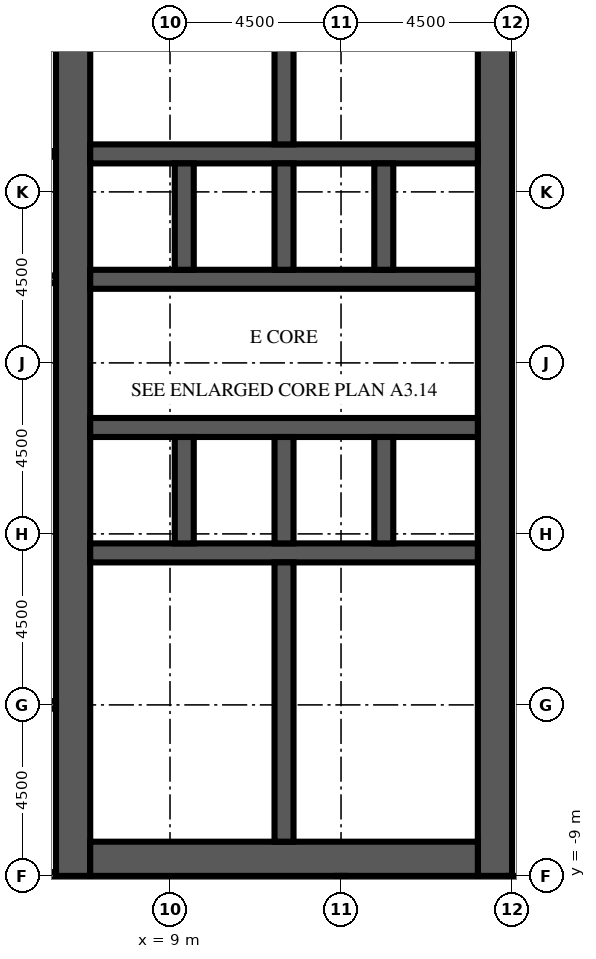
"""IFC4 building model, lengths in metres.
Left out: names, types, materials, properties, quantities, classifications, styles, units other than length and angle.
Written with IfcOpenShell. Run it as: python <this file> out.ifc"""

import sys

from ifc_helpers import new_model, si_unit, direction, frame, frame_2d, origin, place, context, subcontext, project, spatial, rectangle, extrude, element, fill, save


model = new_model("IFC4")
c1 = context("Model", 3, precision=1e-05, world=origin(), true_north=direction((0.0, 1.0)))
c2 = subcontext(c1, "Body", "Model", "MODEL_VIEW")
j1 = project(units=[si_unit("LENGTHUNIT", "METRE"), si_unit("PLANEANGLEUNIT", "RADIAN")], contexts=[c1])
p1 = place(None, origin())
s1 = spatial("IfcSite", under=j1, at=p1, CompositionType="ELEMENT")
p2 = place(p1, origin())
s2 = spatial("IfcBuilding", under=s1, at=p2, CompositionType="ELEMENT")
p3 = place(p2, frame((0.0, 0.0, 82.0)))
s3 = spatial("IfcBuildingStorey", under=s2, at=p3, CompositionType="ELEMENT", Elevation=82.0)
p4 = place(p3, frame((6.45, -9.0, 0.0), z_axis=(0.0, 0.0, 1.0), x_axis=(0.0, 1.0, 0.0)))
e1 = element("IfcWall", 1, at=p4, inside=s3, PredefinedType="SHEAR", context=c2, shape_type="SweptSolid", body=[
    extrude(rectangle(XDim=27.5, YDim=0.9, at=frame_2d((13.75, 0.0))), origin(), (0.0, 0.0, 1.0), 4.1),
])
p5 = place(p4, frame((12.55, 0.0, 0.0)))
e2 = element("IfcOpeningElement", 2, at=p5, cuts=e1, PredefinedType="OPENING", context=c2, shape_type="SweptSolid", body=[
    extrude(rectangle(XDim=2.4, YDim=2.4, at=frame_2d((1.2, 1.2))), frame((0.0, 0.46, 0.0), z_axis=(0.0, -1.0, 0.0), x_axis=(1.0, 0.0, 0.0)), (0.0, 0.0, 1.0), 0.92),
])
p6 = place(p4, frame((5.445, 0.0, 0.0)))
e3 = element("IfcOpeningElement", 3, at=p6, cuts=e1, PredefinedType="OPENING", context=c2, shape_type="SweptSolid", body=[
    extrude(rectangle(XDim=1.2, YDim=2.1, at=frame_2d((0.6, 1.05))), frame((0.0, 0.46, 0.0), z_axis=(0.0, -1.0, 0.0), x_axis=(1.0, 0.0, 0.0)), (0.0, 0.0, 1.0), 0.92),
])
p7 = place(p4, frame((19.485, 0.0, 0.0)))
e4 = element("IfcOpeningElement", 4, at=p7, cuts=e1, PredefinedType="OPENING", context=c2, shape_type="SweptSolid", body=[
    extrude(rectangle(XDim=1.0, YDim=2.1, at=frame_2d((0.5, 1.05))), frame((0.0, 0.46, 0.0), z_axis=(0.0, -1.0, 0.0), x_axis=(1.0, 0.0, 0.0)), (0.0, 0.0, 1.0), 0.92),
])
p8 = place(p4, frame((21.139, 0.0, 0.0)))
e5 = element("IfcOpeningElement", 5, at=p8, cuts=e1, PredefinedType="OPENING", context=c2, shape_type="SweptSolid", body=[
    extrude(rectangle(XDim=1.0, YDim=2.1, at=frame_2d((0.5, 1.05))), frame((0.0, 0.46, 0.0), z_axis=(0.0, -1.0, 0.0), x_axis=(1.0, 0.0, 0.0)), (0.0, 0.0, 1.0), 0.92),
])
p9 = place(p4, frame((23.16, 0.0, 0.0)))
e6 = element("IfcOpeningElement", 6, at=p9, cuts=e1, PredefinedType="OPENING", context=c2, shape_type="SweptSolid", body=[
    extrude(rectangle(XDim=1.0, YDim=2.1, at=frame_2d((0.5, 1.05))), frame((0.0, 0.46, 0.0), z_axis=(0.0, -1.0, 0.0), x_axis=(1.0, 0.0, 0.0)), (0.0, 0.0, 1.0), 0.92),
])
p10 = place(p4, frame((25.181, 0.0, 0.0)))
e7 = element("IfcOpeningElement", 7, at=p10, cuts=e1, PredefinedType="OPENING", context=c2, shape_type="SweptSolid", body=[
    extrude(rectangle(XDim=1.0, YDim=2.1, at=frame_2d((0.5, 1.05))), frame((0.0, 0.46, 0.0), z_axis=(0.0, -1.0, 0.0), x_axis=(1.0, 0.0, 0.0)), (0.0, 0.0, 1.0), 0.92),
])
p11 = place(p3, frame((17.55, -9.0, 0.0), z_axis=(0.0, 0.0, 1.0), x_axis=(0.0, 1.0, 0.0)))
e8 = element("IfcWall", 8, at=p11, inside=s3, PredefinedType="SHEAR", context=c2, shape_type="SweptSolid", body=[
    extrude(rectangle(XDim=27.5, YDim=0.9, at=frame_2d((13.75, 0.0))), origin(), (0.0, 0.0, 1.0), 4.1),
])
p12 = place(p11, frame((12.55, 0.0, 0.0)))
e9 = element("IfcOpeningElement", 9, at=p12, cuts=e8, PredefinedType="OPENING", context=c2, shape_type="SweptSolid", body=[
    extrude(rectangle(XDim=2.4, YDim=2.4, at=frame_2d((1.2, 1.2))), frame((0.0, 0.46, 0.0), z_axis=(0.0, -1.0, 0.0), x_axis=(1.0, 0.0, 0.0)), (0.0, 0.0, 1.0), 0.92),
])
p13 = place(p11, frame((6.825, 0.0, 0.0)))
e10 = element("IfcOpeningElement", 10, at=p13, cuts=e8, PredefinedType="OPENING", context=c2, shape_type="SweptSolid", body=[
    extrude(rectangle(XDim=1.2, YDim=2.1, at=frame_2d((0.6, 1.05))), frame((0.0, 0.46, 0.0), z_axis=(0.0, -1.0, 0.0), x_axis=(1.0, 0.0, 0.0)), (0.0, 0.0, 1.0), 0.92),
])
p14 = place(p11, frame((19.475, 0.0, 0.0)))
e11 = element("IfcOpeningElement", 11, at=p14, cuts=e8, PredefinedType="OPENING", context=c2, shape_type="SweptSolid", body=[
    extrude(rectangle(XDim=1.2, YDim=2.1, at=frame_2d((0.6, 1.05))), frame((0.0, 0.46, 0.0), z_axis=(0.0, -1.0, 0.0), x_axis=(1.0, 0.0, 0.0)), (0.0, 0.0, 1.0), 0.92),
])
p15 = place(p3, frame((6.9, -8.55, 0.0), z_axis=(0.0, 0.0, 1.0), x_axis=(1.0, 0.0, 0.0)))
e12 = element("IfcWall", 12, at=p15, inside=s3, PredefinedType="SHEAR", context=c2, shape_type="SweptSolid", body=[
    extrude(rectangle(XDim=10.2, YDim=0.9, at=frame_2d((5.1, 0.0))), origin(), (0.0, 0.0, 1.0), 4.1),
])
p16 = place(p3, frame((6.9, -0.5, 0.0), z_axis=(0.0, 0.0, 1.0), x_axis=(1.0, 0.0, 0.0)))
e13 = element("IfcWall", 13, at=p16, inside=s3, PredefinedType="SHEAR", context=c2, shape_type="SweptSolid", body=[
    extrude(rectangle(XDim=10.2, YDim=0.5, at=frame_2d((5.1, 0.0))), origin(), (0.0, 0.0, 1.0), 4.1),
])
p17 = place(p3, frame((6.9, 2.8, 0.0), z_axis=(0.0, 0.0, 1.0), x_axis=(1.0, 0.0, 0.0)))
e14 = element("IfcWall", 14, at=p17, inside=s3, PredefinedType="SHEAR", context=c2, shape_type="SweptSolid", body=[
    extrude(rectangle(XDim=10.2, YDim=0.5, at=frame_2d((5.1, 0.0))), origin(), (0.0, 0.0, 1.0), 4.1),
])
p18 = place(p17, frame((0.562, 0.0, 0.0)))
e15 = element("IfcOpeningElement", 15, at=p18, cuts=e14, PredefinedType="OPENING", context=c2, shape_type="SweptSolid", body=[
    extrude(rectangle(XDim=1.1, YDim=2.1, at=frame_2d((0.55, 1.05))), frame((0.0, 0.26, 0.0), z_axis=(0.0, -1.0, 0.0), x_axis=(1.0, 0.0, 0.0)), (0.0, 0.0, 1.0), 0.52),
])
p19 = place(p17, frame((3.238, 0.0, 0.0)))
e16 = element("IfcOpeningElement", 16, at=p19, cuts=e14, PredefinedType="OPENING", context=c2, shape_type="SweptSolid", body=[
    extrude(rectangle(XDim=1.1, YDim=2.1, at=frame_2d((0.55, 1.05))), frame((0.0, 0.26, 0.0), z_axis=(0.0, -1.0, 0.0), x_axis=(1.0, 0.0, 0.0)), (0.0, 0.0, 1.0), 0.52),
])
p20 = place(p17, frame((8.538, 0.0, 0.0)))
e17 = element("IfcOpeningElement", 17, at=p20, cuts=e14, PredefinedType="OPENING", context=c2, shape_type="SweptSolid", body=[
    extrude(rectangle(XDim=1.1, YDim=2.1, at=frame_2d((0.55, 1.05))), frame((0.0, 0.26, 0.0), z_axis=(0.0, -1.0, 0.0), x_axis=(1.0, 0.0, 0.0)), (0.0, 0.0, 1.0), 0.52),
])
p21 = place(p3, frame((6.9, 6.7, 0.0), z_axis=(0.0, 0.0, 1.0), x_axis=(1.0, 0.0, 0.0)))
e18 = element("IfcWall", 18, at=p21, inside=s3, PredefinedType="SHEAR", context=c2, shape_type="SweptSolid", body=[
    extrude(rectangle(XDim=10.2, YDim=0.5, at=frame_2d((5.1, 0.0))), origin(), (0.0, 0.0, 1.0), 4.1),
])
p22 = place(p21, frame((0.562, 0.0, 0.0)))
e19 = element("IfcOpeningElement", 19, at=p22, cuts=e18, PredefinedType="OPENING", context=c2, shape_type="SweptSolid", body=[
    extrude(rectangle(XDim=1.1, YDim=2.1, at=frame_2d((0.55, 1.05))), frame((0.0, 0.26, 0.0), z_axis=(0.0, -1.0, 0.0), x_axis=(1.0, 0.0, 0.0)), (0.0, 0.0, 1.0), 0.52),
])
p23 = place(p21, frame((3.288, 0.0, 0.0)))
e20 = element("IfcOpeningElement", 20, at=p23, cuts=e18, PredefinedType="OPENING", context=c2, shape_type="SweptSolid", body=[
    extrude(rectangle(XDim=1.0, YDim=2.1, at=frame_2d((0.5, 1.05))), frame((0.0, 0.26, 0.0), z_axis=(0.0, -1.0, 0.0), x_axis=(1.0, 0.0, 0.0)), (0.0, 0.0, 1.0), 0.52),
])
p24 = place(p21, frame((5.913, 0.0, 0.0)))
e21 = element("IfcOpeningElement", 21, at=p24, cuts=e18, PredefinedType="OPENING", context=c2, shape_type="SweptSolid", body=[
    extrude(rectangle(XDim=1.0, YDim=2.1, at=frame_2d((0.5, 1.05))), frame((0.0, 0.26, 0.0), z_axis=(0.0, -1.0, 0.0), x_axis=(1.0, 0.0, 0.0)), (0.0, 0.0, 1.0), 0.52),
])
p25 = place(p21, frame((8.587, 0.0, 0.0)))
e22 = element("IfcOpeningElement", 22, at=p25, cuts=e18, PredefinedType="OPENING", context=c2, shape_type="SweptSolid", body=[
    extrude(rectangle(XDim=1.0, YDim=2.1, at=frame_2d((0.5, 1.05))), frame((0.0, 0.26, 0.0), z_axis=(0.0, -1.0, 0.0), x_axis=(1.0, 0.0, 0.0)), (0.0, 0.0, 1.0), 0.52),
])
p26 = place(p3, frame((6.9, 10.0, 0.0), z_axis=(0.0, 0.0, 1.0), x_axis=(1.0, 0.0, 0.0)))
e23 = element("IfcWall", 23, at=p26, inside=s3, PredefinedType="SHEAR", context=c2, shape_type="SweptSolid", body=[
    extrude(rectangle(XDim=10.2, YDim=0.5, at=frame_2d((5.1, 0.0))), origin(), (0.0, 0.0, 1.0), 4.1),
])
for number, where, z_axis, x_axis in (
    (24, (9.375, -0.25, 0.0), (0.0, 0.0, 1.0), (0.0, 1.0, 0.0)),
    (25, (9.375, 6.95, 0.0), (0.0, 0.0, 1.0), (0.0, 1.0, 0.0)),
    (26, (12.0, -0.25, 0.0), (0.0, 0.0, 1.0), (0.0, 1.0, 0.0)),
    (27, (12.0, 6.95, 0.0), (0.0, 0.0, 1.0), (0.0, 1.0, 0.0)),
    (28, (14.625, -0.25, 0.0), (0.0, 0.0, 1.0), (0.0, 1.0, 0.0)),
    (29, (14.625, 6.95, 0.0), (0.0, 0.0, 1.0), (0.0, 1.0, 0.0)),
):
    element("IfcWall", number, at=place(p3, frame(where, z_axis=z_axis, x_axis=x_axis)), inside=s3, PredefinedType="SHEAR", context=c2, shape_type="SweptSolid", body=[
        extrude(rectangle(XDim=2.8, YDim=0.5, at=frame_2d((1.4, 0.0))), origin(), (0.0, 0.0, 1.0), 4.1),
    ])
for number, where, z_axis, x_axis in (
    (30, (12.0, -8.1, 0.0), (0.0, 0.0, 1.0), (0.0, 1.0, 0.0)),
    (31, (12.0, 10.25, 0.0), (0.0, 0.0, 1.0), (0.0, 1.0, 0.0)),
):
    element("IfcWall", number, at=place(p3, frame(where, z_axis=z_axis, x_axis=x_axis)), inside=s3, PredefinedType="SHEAR", context=c2, shape_type="SweptSolid", body=[
        extrude(rectangle(XDim=7.35, YDim=0.5, at=frame_2d((3.675, 0.0))), origin(), (0.0, 0.0, 1.0), 4.1),
    ])
p27 = place(p3, frame((6.9, -5.16, 0.0), z_axis=(0.0, 0.0, 1.0), x_axis=(1.0, 0.0, 0.0)))
e32 = element("IfcWall", 32, at=p27, inside=s3, PredefinedType="PARTITIONING", context=c2, shape_type="SweptSolid", body=[
    extrude(rectangle(XDim=1.5, YDim=0.1, at=frame_2d((0.75, 0.0))), origin(), (0.0, 0.0, 1.0), 3.65),
])
p28 = place(p27, frame((0.25, 0.0, 0.0)))
e33 = element("IfcOpeningElement", 33, at=p28, cuts=e32, PredefinedType="OPENING", context=c2, shape_type="SweptSolid", body=[
    extrude(rectangle(XDim=1.0, YDim=2.1, at=frame_2d((0.5, 1.05))), frame((0.0, 0.06, 0.0), z_axis=(0.0, -1.0, 0.0), x_axis=(1.0, 0.0, 0.0)), (0.0, 0.0, 1.0), 0.12),
])
p29 = place(p3, frame((8.4, -5.16, 0.0), z_axis=(0.0, 0.0, 1.0), x_axis=(0.0, 1.0, 0.0)))
e34 = element("IfcWall", 34, at=p29, inside=s3, PredefinedType="PARTITIONING", context=c2, shape_type="SweptSolid", body=[
    extrude(rectangle(XDim=2.205, YDim=0.1, at=frame_2d((1.103, 0.0))), origin(), (0.0, 0.0, 1.0), 3.65),
])
p30 = place(p29, frame((0.603, 0.0, 0.0)))
e35 = element("IfcOpeningElement", 35, at=p30, cuts=e34, PredefinedType="OPENING", context=c2, shape_type="SweptSolid", body=[
    extrude(rectangle(XDim=1.0, YDim=2.1, at=frame_2d((0.5, 1.05))), frame((0.0, 0.06, 0.0), z_axis=(0.0, -1.0, 0.0), x_axis=(1.0, 0.0, 0.0)), (0.0, 0.0, 1.0), 0.12),
])
p31 = place(p3, frame((8.4, -2.955, 0.0), z_axis=(0.0, 0.0, 1.0), x_axis=(0.0, 1.0, 0.0)))
e36 = element("IfcWall", 36, at=p31, inside=s3, PredefinedType="PARTITIONING", context=c2, shape_type="SweptSolid", body=[
    extrude(rectangle(XDim=2.205, YDim=0.1, at=frame_2d((1.103, 0.0))), origin(), (0.0, 0.0, 1.0), 3.65),
])
p32 = place(p31, frame((0.603, 0.0, 0.0)))
e37 = element("IfcOpeningElement", 37, at=p32, cuts=e36, PredefinedType="OPENING", context=c2, shape_type="SweptSolid", body=[
    extrude(rectangle(XDim=1.0, YDim=2.1, at=frame_2d((0.5, 1.05))), frame((0.0, 0.06, 0.0), z_axis=(0.0, -1.0, 0.0), x_axis=(1.0, 0.0, 0.0)), (0.0, 0.0, 1.0), 0.12),
])
for number, where, z_axis, x_axis in (
    (38, (8.4, -5.16, 0.0), (0.0, 0.0, 1.0), (1.0, 0.0, 0.0)),
    (39, (8.4, -2.955, 0.0), (0.0, 0.0, 1.0), (1.0, 0.0, 0.0)),
):
    element("IfcWall", number, at=place(p3, frame(where, z_axis=z_axis, x_axis=x_axis)), inside=s3, PredefinedType="PARTITIONING", context=c2, shape_type="SweptSolid", body=[
        extrude(rectangle(XDim=3.35, YDim=0.1, at=frame_2d((1.675, 0.0))), origin(), (0.0, 0.0, 1.0), 3.65),
    ])
p33 = place(p3, frame((6.9, 11.72, 0.0), z_axis=(0.0, 0.0, 1.0), x_axis=(1.0, 0.0, 0.0)))
e40 = element("IfcWall", 40, at=p33, inside=s3, PredefinedType="PARTITIONING", context=c2, shape_type="SweptSolid", body=[
    extrude(rectangle(XDim=4.85, YDim=0.1, at=frame_2d((2.425, 0.0))), origin(), (0.0, 0.0, 1.0), 3.65),
])
p34 = place(p3, frame((13.5, -21.9, 0.0), z_axis=(0.0, 0.0, 1.0), x_axis=(0.0, 1.0, 0.0)))
e41 = element("IfcWall", 41, at=p34, inside=s3, PredefinedType="PARTITIONING", context=c2, shape_type="SweptSolid", body=[
    extrude(rectangle(XDim=12.9, YDim=0.2, at=frame_2d((6.45, 0.0))), origin(), (0.0, 0.0, 1.0), 3.65),
])
p35 = place(p3, frame((18.0, -17.3, 0.0), z_axis=(0.0, 0.0, 1.0), x_axis=(0.0, 1.0, 0.0)))
e42 = element("IfcWall", 42, at=p35, inside=s3, PredefinedType="PARTITIONING", context=c2, shape_type="SweptSolid", body=[
    extrude(rectangle(XDim=8.3, YDim=0.2, at=frame_2d((4.15, 0.0))), origin(), (0.0, 0.0, 1.0), 3.65),
])
p36 = place(p35, frame((4.4, 0.0, 0.0)))
e43 = element("IfcOpeningElement", 43, at=p36, cuts=e42, PredefinedType="OPENING", context=c2, shape_type="SweptSolid", body=[
    extrude(rectangle(XDim=1.0, YDim=2.1, at=frame_2d((0.5, 1.05))), frame((0.0, 0.11, 0.0), z_axis=(0.0, -1.0, 0.0), x_axis=(1.0, 0.0, 0.0)), (0.0, 0.0, 1.0), 0.22),
])
p37 = place(p3, frame((1.5, -9.0, 0.0), z_axis=(0.0, 0.0, 1.0), x_axis=(1.0, 0.0, 0.0)))
e44 = element("IfcWall", 44, at=p37, inside=s3, PredefinedType="PARTITIONING", context=c2, shape_type="SweptSolid", body=[
    extrude(rectangle(XDim=4.5, YDim=0.2, at=frame_2d((2.25, 0.0))), origin(), (0.0, 0.0, 1.0), 3.65),
])
p38 = place(p3, frame((6.0, -4.5, 0.0), z_axis=(0.0, 0.0, 1.0), x_axis=(-1.0, 0.0, 0.0)))
e45 = element("IfcWall", 45, at=p38, inside=s3, PredefinedType="PARTITIONING", context=c2, shape_type="SweptSolid", body=[
    extrude(rectangle(XDim=4.5, YDim=0.2, at=frame_2d((2.25, 0.0))), origin(), (0.0, 0.0, 1.0), 3.65),
])
p39 = place(p38, frame((1.15, 0.0, 0.0)))
e46 = element("IfcOpeningElement", 46, at=p39, cuts=e45, PredefinedType="OPENING", context=c2, shape_type="SweptSolid", body=[
    extrude(rectangle(XDim=1.0, YDim=2.1, at=frame_2d((0.5, 1.05))), frame((0.0, 0.11, 0.0), z_axis=(0.0, -1.0, 0.0), x_axis=(1.0, 0.0, 0.0)), (0.0, 0.0, 1.0), 0.22),
])
p40 = place(p3, frame((1.5, 6.7, 0.0), z_axis=(0.0, 0.0, 1.0), x_axis=(1.0, 0.0, 0.0)))
e47 = element("IfcWall", 47, at=p40, inside=s3, PredefinedType="PARTITIONING", context=c2, shape_type="SweptSolid", body=[
    extrude(rectangle(XDim=4.5, YDim=0.2, at=frame_2d((2.25, 0.0))), origin(), (0.0, 0.0, 1.0), 3.65),
])
p41 = place(p40, frame((1.85, 0.0, 0.0)))
e48 = element("IfcOpeningElement", 48, at=p41, cuts=e47, PredefinedType="OPENING", context=c2, shape_type="SweptSolid", body=[
    extrude(rectangle(XDim=1.0, YDim=2.1, at=frame_2d((0.5, 1.05))), frame((0.0, 0.11, 0.0), z_axis=(0.0, -1.0, 0.0), x_axis=(1.0, 0.0, 0.0)), (0.0, 0.0, 1.0), 0.22),
])
p42 = place(p3, frame((1.5, 10.0, 0.0), z_axis=(0.0, 0.0, 1.0), x_axis=(1.0, 0.0, 0.0)))
e49 = element("IfcWall", 49, at=p42, inside=s3, PredefinedType="PARTITIONING", context=c2, shape_type="SweptSolid", body=[
    extrude(rectangle(XDim=4.5, YDim=0.15, at=frame_2d((2.25, 0.0))), origin(), (0.0, 0.0, 1.0), 3.65),
])
p43 = place(p42, frame((1.35, 0.0, 0.0)))
e50 = element("IfcOpeningElement", 50, at=p43, cuts=e49, PredefinedType="OPENING", context=c2, shape_type="SweptSolid", body=[
    extrude(rectangle(XDim=1.0, YDim=2.1, at=frame_2d((0.5, 1.05))), frame((0.0, 0.085, 0.0), z_axis=(0.0, -1.0, 0.0), x_axis=(1.0, 0.0, 0.0)), (0.0, 0.0, 1.0), 0.17),
])
p44 = place(p18, origin())
e51 = element("IfcDoor", 51, at=p44, inside=s3, OperationType="DOUBLE_DOOR_SLIDING", PredefinedType="DOOR", context=c2, shape_type="SweptSolid", body=[
    extrude(rectangle(XDim=1.1, YDim=2.1, at=frame_2d((0.55, 1.05))), frame((0.0, 0.025, 0.0), z_axis=(0.0, -1.0, 0.0), x_axis=(1.0, 0.0, 0.0)), (0.0, 0.0, 1.0), 0.05),
])
fill(e15, e51)
p45 = place(p19, origin())
e52 = element("IfcDoor", 52, at=p45, inside=s3, OperationType="DOUBLE_DOOR_SLIDING", PredefinedType="DOOR", context=c2, shape_type="SweptSolid", body=[
    extrude(rectangle(XDim=1.1, YDim=2.1, at=frame_2d((0.55, 1.05))), frame((0.0, 0.025, 0.0), z_axis=(0.0, -1.0, 0.0), x_axis=(1.0, 0.0, 0.0)), (0.0, 0.0, 1.0), 0.05),
])
fill(e16, e52)
p46 = place(p20, origin())
e53 = element("IfcDoor", 53, at=p46, inside=s3, OperationType="DOUBLE_DOOR_SLIDING", PredefinedType="DOOR", context=c2, shape_type="SweptSolid", body=[
    extrude(rectangle(XDim=1.1, YDim=2.1, at=frame_2d((0.55, 1.05))), frame((0.0, 0.025, 0.0), z_axis=(0.0, -1.0, 0.0), x_axis=(1.0, 0.0, 0.0)), (0.0, 0.0, 1.0), 0.05),
])
fill(e17, e53)
p47 = place(p22, origin())
e54 = element("IfcDoor", 54, at=p47, inside=s3, OperationType="DOUBLE_DOOR_SLIDING", PredefinedType="DOOR", context=c2, shape_type="SweptSolid", body=[
    extrude(rectangle(XDim=1.1, YDim=2.1, at=frame_2d((0.55, 1.05))), frame((0.0, 0.025, 0.0), z_axis=(0.0, -1.0, 0.0), x_axis=(1.0, 0.0, 0.0)), (0.0, 0.0, 1.0), 0.05),
])
fill(e19, e54)
p48 = place(p5, origin())
e55 = element("IfcDoor", 55, at=p48, inside=s3, OperationType="DOUBLE_DOOR_DOUBLE_SWING", PredefinedType="DOOR", context=c2, shape_type="SweptSolid", body=[
    extrude(rectangle(XDim=2.4, YDim=2.4, at=frame_2d((1.2, 1.2))), frame((0.0, 0.025, 0.0), z_axis=(0.0, -1.0, 0.0), x_axis=(1.0, 0.0, 0.0)), (0.0, 0.0, 1.0), 0.05),
])
fill(e2, e55)
p49 = place(p12, origin())
e56 = element("IfcDoor", 56, at=p49, inside=s3, OperationType="DOUBLE_DOOR_DOUBLE_SWING", PredefinedType="DOOR", context=c2, shape_type="SweptSolid", body=[
    extrude(rectangle(XDim=2.4, YDim=2.4, at=frame_2d((1.2, 1.2))), frame((0.0, 0.025, 0.0), z_axis=(0.0, -1.0, 0.0), x_axis=(1.0, 0.0, 0.0)), (0.0, 0.0, 1.0), 0.05),
])
fill(e9, e56)
p50 = place(p13, frame((1.2, 0.0, 0.0), z_axis=(0.0, 0.0, 1.0), x_axis=(-1.0, 0.0, 0.0)))
e57 = element("IfcDoor", 57, at=p50, inside=s3, OperationType="SINGLE_SWING_LEFT", PredefinedType="DOOR", context=c2, shape_type="SweptSolid", body=[
    extrude(rectangle(XDim=1.2, YDim=2.1, at=frame_2d((0.6, 1.05))), frame((0.0, 0.025, 0.0), z_axis=(0.0, -1.0, 0.0), x_axis=(1.0, 0.0, 0.0)), (0.0, 0.0, 1.0), 0.05),
])
fill(e10, e57)
p51 = place(p14, frame((1.2, 0.0, 0.0), z_axis=(0.0, 0.0, 1.0), x_axis=(-1.0, 0.0, 0.0)))
e58 = element("IfcDoor", 58, at=p51, inside=s3, OperationType="SINGLE_SWING_LEFT", PredefinedType="DOOR", context=c2, shape_type="SweptSolid", body=[
    extrude(rectangle(XDim=1.2, YDim=2.1, at=frame_2d((0.6, 1.05))), frame((0.0, 0.025, 0.0), z_axis=(0.0, -1.0, 0.0), x_axis=(1.0, 0.0, 0.0)), (0.0, 0.0, 1.0), 0.05),
])
fill(e11, e58)
p52 = place(p23, origin())
e59 = element("IfcDoor", 59, at=p52, inside=s3, OperationType="SINGLE_SWING_RIGHT", PredefinedType="DOOR", context=c2, shape_type="SweptSolid", body=[
    extrude(rectangle(XDim=1.0, YDim=2.1, at=frame_2d((0.5, 1.05))), frame((0.0, 0.025, 0.0), z_axis=(0.0, -1.0, 0.0), x_axis=(1.0, 0.0, 0.0)), (0.0, 0.0, 1.0), 0.05),
])
fill(e20, e59)
p53 = place(p24, origin())
e60 = element("IfcDoor", 60, at=p53, inside=s3, OperationType="SINGLE_SWING_LEFT", PredefinedType="DOOR", context=c2, shape_type="SweptSolid", body=[
    extrude(rectangle(XDim=1.0, YDim=2.1, at=frame_2d((0.5, 1.05))), frame((0.0, 0.025, 0.0), z_axis=(0.0, -1.0, 0.0), x_axis=(1.0, 0.0, 0.0)), (0.0, 0.0, 1.0), 0.05),
])
fill(e21, e60)
p54 = place(p25, origin())
e61 = element("IfcDoor", 61, at=p54, inside=s3, OperationType="SINGLE_SWING_RIGHT", PredefinedType="DOOR", context=c2, shape_type="SweptSolid", body=[
    extrude(rectangle(XDim=1.0, YDim=2.1, at=frame_2d((0.5, 1.05))), frame((0.0, 0.025, 0.0), z_axis=(0.0, -1.0, 0.0), x_axis=(1.0, 0.0, 0.0)), (0.0, 0.0, 1.0), 0.05),
])
fill(e22, e61)
p55 = place(p6, origin())
e62 = element("IfcDoor", 62, at=p55, inside=s3, OperationType="SINGLE_SWING_RIGHT", PredefinedType="DOOR", context=c2, shape_type="SweptSolid", body=[
    extrude(rectangle(XDim=1.2, YDim=2.1, at=frame_2d((0.6, 1.05))), frame((0.0, -0.375, 0.0), z_axis=(0.0, -1.0, 0.0), x_axis=(1.0, 0.0, 0.0)), (0.0, 0.0, 1.0), 0.05),
])
fill(e3, e62)
p56 = place(p28, origin())
e63 = element("IfcDoor", 63, at=p56, inside=s3, OperationType="SINGLE_SWING_LEFT", PredefinedType="DOOR", context=c2, shape_type="SweptSolid", body=[
    extrude(rectangle(XDim=1.0, YDim=2.1, at=frame_2d((0.5, 1.05))), frame((0.0, 0.025, 0.0), z_axis=(0.0, -1.0, 0.0), x_axis=(1.0, 0.0, 0.0)), (0.0, 0.0, 1.0), 0.05),
])
fill(e33, e63)
p57 = place(p30, origin())
e64 = element("IfcDoor", 64, at=p57, inside=s3, OperationType="SINGLE_SWING_RIGHT", PredefinedType="DOOR", context=c2, shape_type="SweptSolid", body=[
    extrude(rectangle(XDim=1.0, YDim=2.1, at=frame_2d((0.5, 1.05))), frame((0.0, 0.025, 0.0), z_axis=(0.0, -1.0, 0.0), x_axis=(1.0, 0.0, 0.0)), (0.0, 0.0, 1.0), 0.05),
])
fill(e35, e64)
p58 = place(p32, origin())
e65 = element("IfcDoor", 65, at=p58, inside=s3, OperationType="SINGLE_SWING_LEFT", PredefinedType="DOOR", context=c2, shape_type="SweptSolid", body=[
    extrude(rectangle(XDim=1.0, YDim=2.1, at=frame_2d((0.5, 1.05))), frame((0.0, 0.025, 0.0), z_axis=(0.0, -1.0, 0.0), x_axis=(1.0, 0.0, 0.0)), (0.0, 0.0, 1.0), 0.05),
])
fill(e37, e65)
p59 = place(p7, origin())
e66 = element("IfcDoor", 66, at=p59, inside=s3, OperationType="SINGLE_SWING_RIGHT", PredefinedType="DOOR", context=c2, shape_type="SweptSolid", body=[
    extrude(rectangle(XDim=1.0, YDim=2.1, at=frame_2d((0.5, 1.05))), frame((0.0, -0.375, 0.0), z_axis=(0.0, -1.0, 0.0), x_axis=(1.0, 0.0, 0.0)), (0.0, 0.0, 1.0), 0.05),
])
fill(e4, e66)
p60 = place(p8, origin())
e67 = element("IfcDoor", 67, at=p60, inside=s3, OperationType="SINGLE_SWING_LEFT", PredefinedType="DOOR", context=c2, shape_type="SweptSolid", body=[
    extrude(rectangle(XDim=1.0, YDim=2.1, at=frame_2d((0.5, 1.05))), frame((0.0, -0.375, 0.0), z_axis=(0.0, -1.0, 0.0), x_axis=(1.0, 0.0, 0.0)), (0.0, 0.0, 1.0), 0.05),
])
fill(e5, e67)
save(model, sys.argv[1])
